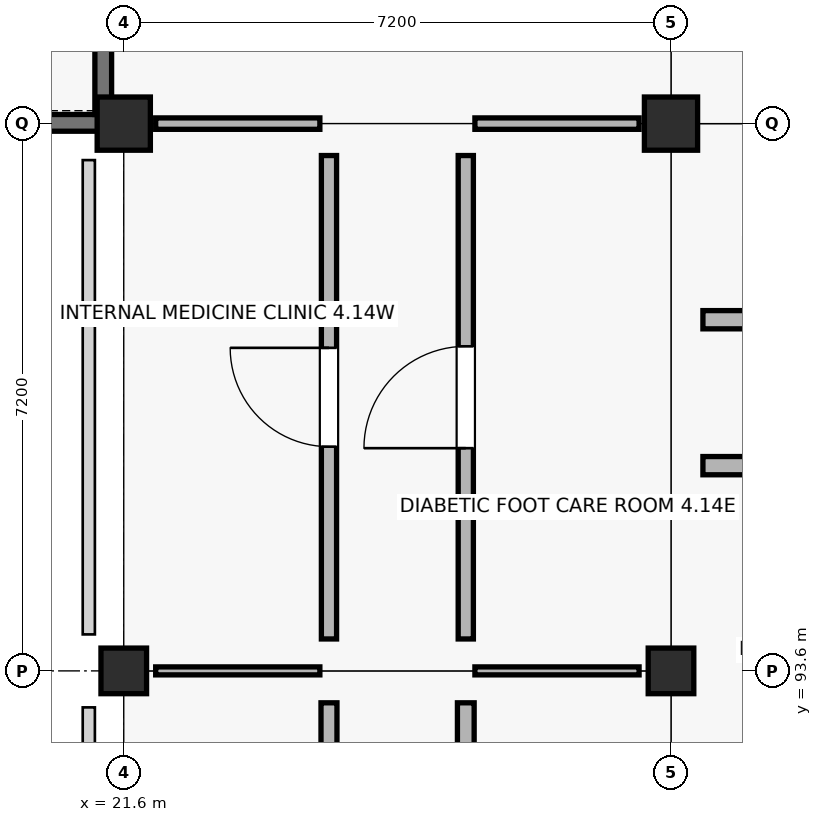
"""IFC4 building model, lengths in metres.
Left out: names, types, materials, properties, quantities, classifications, styles, units other than length and angle.
Written with IfcOpenShell. Run it as: python <this file> out.ifc"""

import sys

from ifc_helpers import new_model, si_unit, direction, frame, frame_2d, origin, origin_2d, place, context, subcontext, project, spatial, rectangle, extrude, element, fill, save


model = new_model("IFC4")
c1 = context("Model", 3, precision=1e-05, world=origin(), true_north=direction((0.0, 1.0)))
c2 = subcontext(c1, "Body", "Model", "MODEL_VIEW")
j1 = project(units=[si_unit("LENGTHUNIT", "METRE"), si_unit("PLANEANGLEUNIT", "RADIAN")], contexts=[c1])
p1 = place(None, origin())
s1 = spatial("IfcSite", under=j1, at=p1, CompositionType="ELEMENT")
p2 = place(p1, origin())
s2 = spatial("IfcBuilding", under=s1, at=p2, CompositionType="ELEMENT")
p3 = place(p2, frame((0.0, 0.0, 4.5)))
s3 = spatial("IfcBuildingStorey", under=s2, at=p3, CompositionType="ELEMENT", Elevation=4.5)
p4 = place(p3, frame((21.6, 93.6, 0.0), z_axis=(0.0, 0.0, 1.0), x_axis=(1.0, 0.0, 0.0)))
e1 = element("IfcColumn", 1, at=p4, inside=s3, PredefinedType="COLUMN", context=c2, shape_type="SweptSolid", body=[
    extrude(rectangle(XDim=0.6, YDim=0.6, at=origin_2d()), origin(), (0.0, 0.0, 1.0), 4.5),
])
p5 = place(p3, frame((21.6, 100.8, 0.0), z_axis=(0.0, 0.0, 1.0), x_axis=(1.0, 0.0, 0.0)))
e2 = element("IfcColumn", 2, at=p5, inside=s3, PredefinedType="COLUMN", context=c2, shape_type="SweptSolid", body=[
    extrude(rectangle(XDim=0.7, YDim=0.7, at=origin_2d()), origin(), (0.0, 0.0, 1.0), 4.5),
])
p6 = place(p3, frame((28.8, 93.6, 0.0), z_axis=(0.0, 0.0, 1.0), x_axis=(1.0, 0.0, 0.0)))
e3 = element("IfcColumn", 3, at=p6, inside=s3, PredefinedType="COLUMN", context=c2, shape_type="SweptSolid", body=[
    extrude(rectangle(XDim=0.6, YDim=0.6, at=origin_2d()), origin(), (0.0, 0.0, 1.0), 4.5),
])
p7 = place(p3, frame((28.8, 100.8, 0.0), z_axis=(0.0, 0.0, 1.0), x_axis=(1.0, 0.0, 0.0)))
e4 = element("IfcColumn", 4, at=p7, inside=s3, PredefinedType="COLUMN", context=c2, shape_type="SweptSolid", body=[
    extrude(rectangle(XDim=0.7, YDim=0.7, at=origin_2d()), origin(), (0.0, 0.0, 1.0), 4.5),
])
p8 = place(p3, frame((14.56, 100.81, 0.0), z_axis=(0.0, 0.0, 1.0), x_axis=(1.0, 0.0, 0.0)))
e5 = element("IfcWall", 5, at=p8, inside=s3, PredefinedType="SHEAR", context=c2, shape_type="SweptSolid", body=[
    extrude(rectangle(XDim=6.88, YDim=0.22, at=frame_2d((3.44, 0.0))), origin(), (0.0, 0.0, 1.0), 4.22),
])
p9 = place(p3, frame((21.33, 100.92, 0.0), z_axis=(0.0, 0.0, 1.0), x_axis=(0.0, 1.0, 0.0)))
e6 = element("IfcWall", 6, at=p9, inside=s3, PredefinedType="SHEAR", context=c2, shape_type="SweptSolid", body=[
    extrude(rectangle(XDim=3.0, YDim=0.22, at=frame_2d((1.5, 0.0))), origin(), (0.0, 0.0, 1.0), 4.22),
])
p10 = place(p3, frame((29.22, 96.3, 0.0), z_axis=(0.0, 0.0, 1.0), x_axis=(1.0, 0.0, 0.0)))
e7 = element("IfcWall", 7, at=p10, inside=s3, PredefinedType="SOLIDWALL", context=c2, shape_type="SweptSolid", body=[
    extrude(rectangle(XDim=6.36, YDim=0.24, at=frame_2d((3.18, 0.0))), origin(), (0.0, 0.0, 1.0), 3.36),
])
p11 = place(p10, frame((2.53, 0.0, 0.0)))
e8 = element("IfcOpeningElement", 8, at=p11, cuts=e7, PredefinedType="OPENING", context=c2, shape_type="SweptSolid", body=[
    extrude(rectangle(XDim=1.3, YDim=2.15, at=frame_2d((0.65, 1.075))), frame((0.0, 0.13, 0.0), z_axis=(0.0, -1.0, 0.0), x_axis=(1.0, 0.0, 0.0)), (0.0, 0.0, 1.0), 0.26),
])
p12 = place(p3, frame((29.22, 98.22, 0.0), z_axis=(0.0, 0.0, 1.0), x_axis=(1.0, 0.0, 0.0)))
e9 = element("IfcWall", 9, at=p12, inside=s3, PredefinedType="SOLIDWALL", context=c2, shape_type="SweptSolid", body=[
    extrude(rectangle(XDim=6.36, YDim=0.24, at=frame_2d((3.18, 0.0))), origin(), (0.0, 0.0, 1.0), 3.36),
])
p13 = place(p12, frame((2.505, 0.0, 0.0)))
e10 = element("IfcOpeningElement", 10, at=p13, cuts=e9, PredefinedType="OPENING", context=c2, shape_type="SweptSolid", body=[
    extrude(rectangle(XDim=1.35, YDim=2.2, at=frame_2d((0.675, 1.1))), frame((0.0, 0.13, 0.0), z_axis=(0.0, -1.0, 0.0), x_axis=(1.0, 0.0, 0.0)), (0.0, 0.0, 1.0), 0.26),
])
p14 = place(p3, frame((24.3, 86.82, 0.0), z_axis=(0.0, 0.0, 1.0), x_axis=(0.0, 1.0, 0.0)))
e11 = element("IfcWall", 11, at=p14, inside=s3, PredefinedType="PLUMBINGWALL", context=c2, shape_type="SweptSolid", body=[
    extrude(rectangle(XDim=6.36, YDim=0.21, at=frame_2d((3.18, 0.0))), origin(), (0.0, 0.0, 1.0), 3.36),
])
p15 = place(p14, frame((2.57, 0.0, 0.0)))
e12 = element("IfcOpeningElement", 12, at=p15, cuts=e11, PredefinedType="OPENING", context=c2, shape_type="SweptSolid", body=[
    extrude(rectangle(XDim=1.22, YDim=2.04, at=frame_2d((0.61, 1.02))), frame((0.0, 0.115, 0.0), z_axis=(0.0, -1.0, 0.0), x_axis=(1.0, 0.0, 0.0)), (0.0, 0.0, 1.0), 0.23),
])
p16 = place(p3, frame((22.02, 93.6, 0.0), z_axis=(0.0, 0.0, 1.0), x_axis=(1.0, 0.0, 0.0)))
e13 = element("IfcWall", 13, at=p16, inside=s3, PredefinedType="PARTITIONING", context=c2, shape_type="SweptSolid", body=[
    extrude(rectangle(XDim=2.16, YDim=0.105, at=frame_2d((1.08, 0.0))), origin(), (0.0, 0.0, 1.0), 3.36),
])
p17 = place(p3, frame((26.1, 86.82, 0.0), z_axis=(0.0, 0.0, 1.0), x_axis=(0.0, 1.0, 0.0)))
e14 = element("IfcWall", 14, at=p17, inside=s3, PredefinedType="SOLIDWALL", context=c2, shape_type="SweptSolid", body=[
    extrude(rectangle(XDim=6.36, YDim=0.22, at=frame_2d((3.18, 0.0))), origin(), (0.0, 0.0, 1.0), 3.36),
])
p18 = place(p17, frame((2.55, 0.0, 0.0)))
e15 = element("IfcOpeningElement", 15, at=p18, cuts=e14, PredefinedType="OPENING", context=c2, shape_type="SweptSolid", body=[
    extrude(rectangle(XDim=1.26, YDim=2.04, at=frame_2d((0.63, 1.02))), frame((0.0, 0.12, 0.0), z_axis=(0.0, -1.0, 0.0), x_axis=(1.0, 0.0, 0.0)), (0.0, 0.0, 1.0), 0.24),
])
p19 = place(p3, frame((26.22, 93.6, 0.0), z_axis=(0.0, 0.0, 1.0), x_axis=(1.0, 0.0, 0.0)))
e16 = element("IfcWall", 16, at=p19, inside=s3, PredefinedType="PARTITIONING", context=c2, shape_type="SweptSolid", body=[
    extrude(rectangle(XDim=2.16, YDim=0.105, at=frame_2d((1.08, 0.0))), origin(), (0.0, 0.0, 1.0), 3.36),
])
p20 = place(p3, frame((24.3, 94.02, 0.0), z_axis=(0.0, 0.0, 1.0), x_axis=(0.0, 1.0, 0.0)))
e17 = element("IfcWall", 17, at=p20, inside=s3, PredefinedType="SOLIDWALL", context=c2, shape_type="SweptSolid", body=[
    extrude(rectangle(XDim=6.36, YDim=0.2, at=frame_2d((3.18, 0.0))), origin(), (0.0, 0.0, 1.0), 3.36),
])
p21 = place(p20, frame((2.53, 0.0, 0.0)))
e18 = element("IfcOpeningElement", 18, at=p21, cuts=e17, PredefinedType="OPENING", context=c2, shape_type="SweptSolid", body=[
    extrude(rectangle(XDim=1.3, YDim=2.04, at=frame_2d((0.65, 1.02))), frame((0.0, 0.11, 0.0), z_axis=(0.0, -1.0, 0.0), x_axis=(1.0, 0.0, 0.0)), (0.0, 0.0, 1.0), 0.22),
])
p22 = place(p3, frame((22.02, 100.8, 0.0), z_axis=(0.0, 0.0, 1.0), x_axis=(1.0, 0.0, 0.0)))
e19 = element("IfcWall", 19, at=p22, inside=s3, PredefinedType="PARTITIONING", context=c2, shape_type="SweptSolid", body=[
    extrude(rectangle(XDim=2.16, YDim=0.15, at=frame_2d((1.08, 0.0))), origin(), (0.0, 0.0, 1.0), 3.36),
])
p23 = place(p3, frame((26.1, 94.02, 0.0), z_axis=(0.0, 0.0, 1.0), x_axis=(0.0, 1.0, 0.0)))
e20 = element("IfcWall", 20, at=p23, inside=s3, PredefinedType="SOLIDWALL", context=c2, shape_type="SweptSolid", body=[
    extrude(rectangle(XDim=6.36, YDim=0.2, at=frame_2d((3.18, 0.0))), origin(), (0.0, 0.0, 1.0), 3.36),
])
p24 = place(p23, frame((2.51, 0.0, 0.0)))
e21 = element("IfcOpeningElement", 21, at=p24, cuts=e20, PredefinedType="OPENING", context=c2, shape_type="SweptSolid", body=[
    extrude(rectangle(XDim=1.34, YDim=2.04, at=frame_2d((0.67, 1.02))), frame((0.0, 0.11, 0.0), z_axis=(0.0, -1.0, 0.0), x_axis=(1.0, 0.0, 0.0)), (0.0, 0.0, 1.0), 0.22),
])
p25 = place(p3, frame((26.22, 100.8, 0.0), z_axis=(0.0, 0.0, 1.0), x_axis=(1.0, 0.0, 0.0)))
e22 = element("IfcWall", 22, at=p25, inside=s3, PredefinedType="PARTITIONING", context=c2, shape_type="SweptSolid", body=[
    extrude(rectangle(XDim=2.16, YDim=0.15, at=frame_2d((1.08, 0.0))), origin(), (0.0, 0.0, 1.0), 3.36),
])
p26 = place(p21, origin())
e23 = element("IfcDoor", 23, at=p26, inside=s3, OperationType="SINGLE_SWING_RIGHT", PredefinedType="DOOR", context=c2, shape_type="SweptSolid", body=[
    extrude(rectangle(XDim=1.3, YDim=2.04, at=frame_2d((0.65, 1.02))), frame((0.0, 0.025, 0.0), z_axis=(0.0, -1.0, 0.0), x_axis=(1.0, 0.0, 0.0)), (0.0, 0.0, 1.0), 0.05),
])
fill(e18, e23)
p27 = place(p24, origin())
e24 = element("IfcDoor", 24, at=p27, inside=s3, OperationType="SINGLE_SWING_LEFT", PredefinedType="DOOR", context=c2, shape_type="SweptSolid", body=[
    extrude(rectangle(XDim=1.34, YDim=2.04, at=frame_2d((0.67, 1.02))), frame((0.0, 0.025, 0.0), z_axis=(0.0, -1.0, 0.0), x_axis=(1.0, 0.0, 0.0)), (0.0, 0.0, 1.0), 0.05),
])
fill(e21, e24)
save(model, sys.argv[1])
